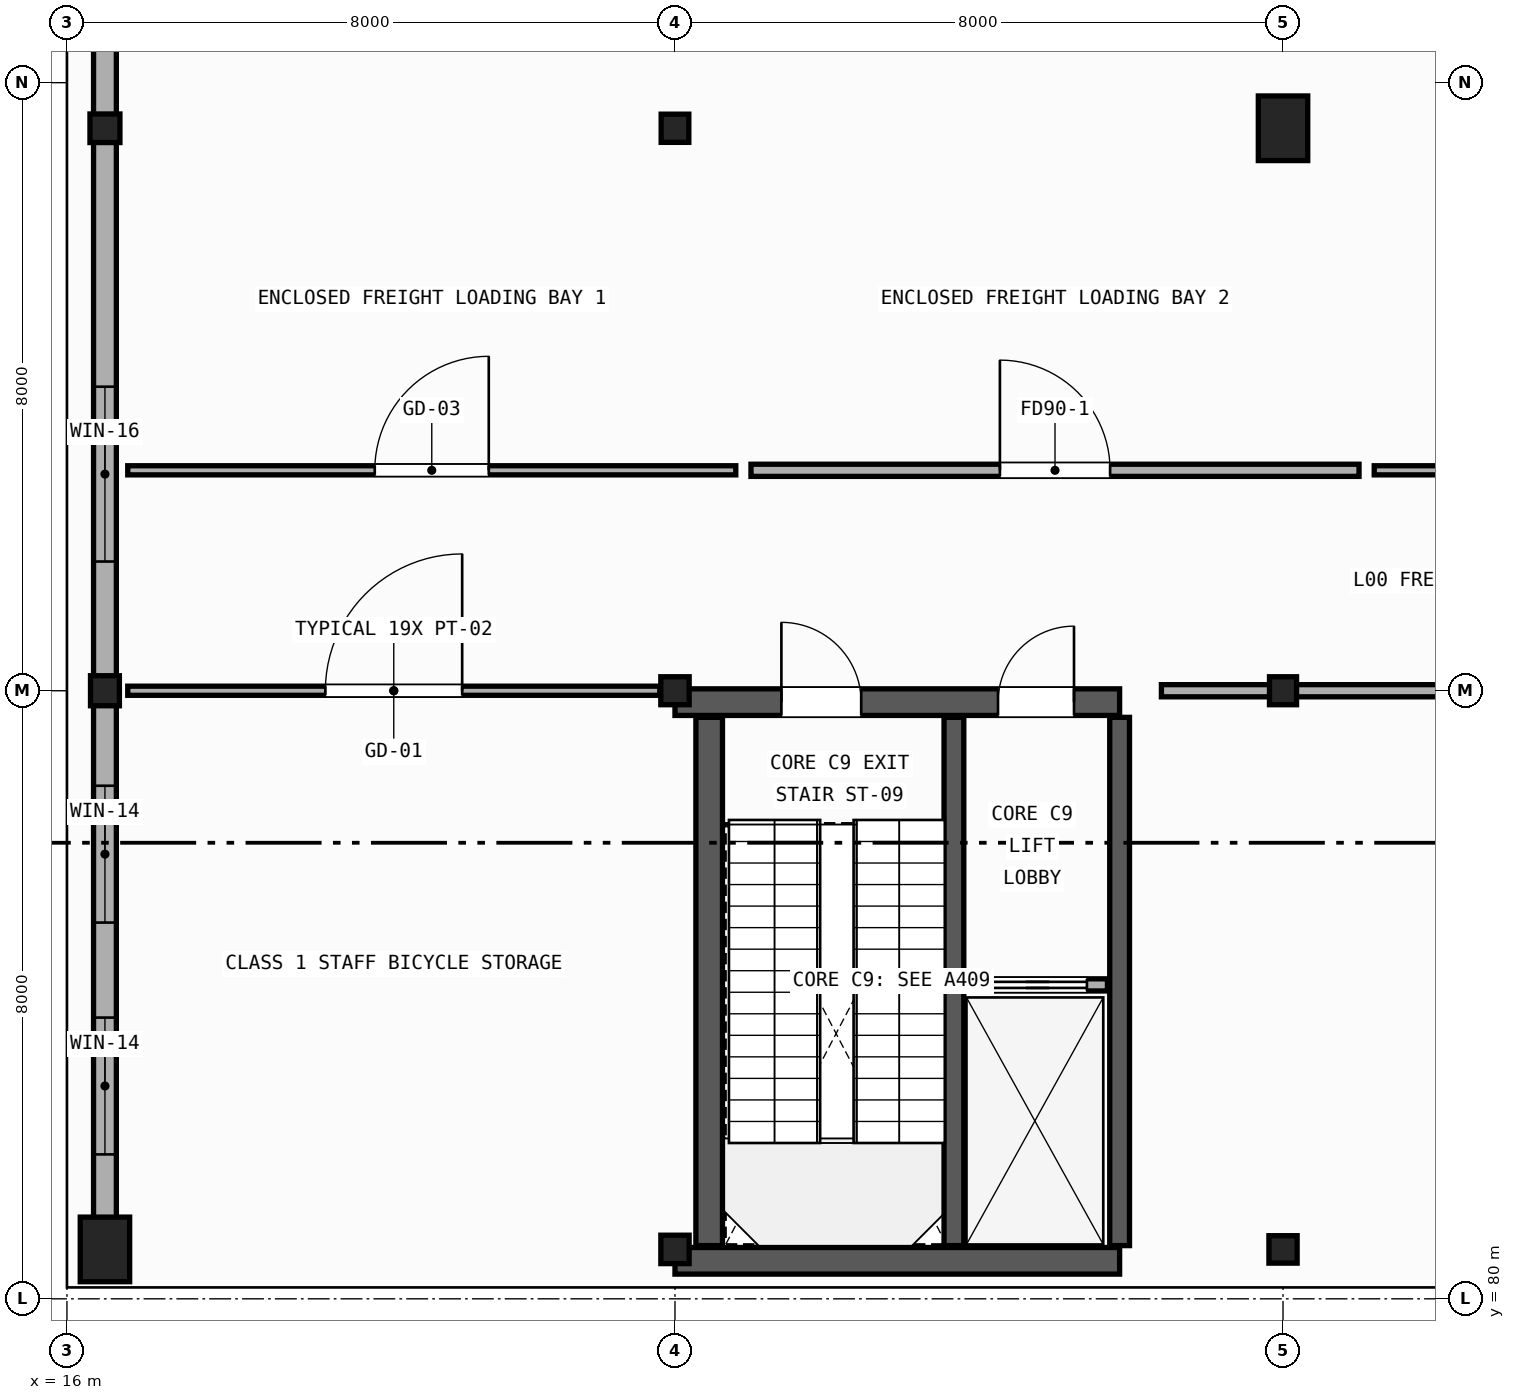
"""IFC4 building model, lengths in metres.
Left out: names, types, materials, properties, quantities, classifications, styles, units other than length and angle.
Written with IfcOpenShell. Run it as: python <this file> out.ifc"""

import sys

from ifc_helpers import new_model, si_unit, direction, frame, frame_2d, origin, origin_2d, place, context, subcontext, project, spatial, rectangle, i_section, extrude, element, fill, save


model = new_model("IFC4")
c1 = context("Model", 3, precision=1e-05, world=origin(), true_north=direction((0.0, 1.0)))
c2 = subcontext(c1, "Body", "Model", "MODEL_VIEW")
j1 = project(units=[si_unit("LENGTHUNIT", "METRE"), si_unit("PLANEANGLEUNIT", "RADIAN")], contexts=[c1])
p1 = place(None, origin())
s1 = spatial("IfcSite", under=j1, at=p1, CompositionType="ELEMENT")
p2 = place(p1, origin())
s2 = spatial("IfcBuilding", under=s1, at=p2, CompositionType="ELEMENT")
p3 = place(p2, origin())
s3 = spatial("IfcBuildingStorey", under=s2, at=p3, CompositionType="ELEMENT", Elevation=0.0)
p4 = place(p3, frame((16.5, 80.65, 0.0), z_axis=(0.0, 0.0, 1.0), x_axis=(1.0, 0.0, 0.0)))
e1 = element("IfcColumn", 1, at=p4, inside=s3, PredefinedType="PILASTER", context=c2, shape_type="SweptSolid", body=[
    extrude(rectangle(XDim=0.65, YDim=0.85, at=origin_2d()), origin(), (0.0, 0.0, 1.0), 5.08),
])
p5 = place(p3, frame((16.5, 88.0, 0.0), z_axis=(0.0, 0.0, 1.0), x_axis=(0.0, 1.0, 0.0)))
e2 = element("IfcColumn", 2, at=p5, inside=s3, PredefinedType="COLUMN", context=c2, shape_type="SweptSolid", body=[
    extrude(i_section(OverallWidth=0.395, OverallDepth=0.38, WebThickness=0.019, FlangeThickness=0.03, FilletRadius=0.015, at=origin_2d()), origin(), (0.0, 0.0, 1.0), 5.08),
])
p6 = place(p3, frame((16.5, 95.4, 0.0), z_axis=(0.0, 0.0, 1.0), x_axis=(1.0, 0.0, 0.0)))
e3 = element("IfcColumn", 3, at=p6, inside=s3, PredefinedType="COLUMN", context=c2, shape_type="SweptSolid", body=[
    extrude(i_section(OverallWidth=0.394, OverallDepth=0.376, WebThickness=0.017, FlangeThickness=0.028, FilletRadius=0.015, at=origin_2d()), origin(), (0.0, 0.0, 1.0), 5.08),
])
p7 = place(p3, frame((24.0, 80.65, 0.0), z_axis=(0.0, 0.0, 1.0), x_axis=(0.0, 1.0, 0.0)))
e4 = element("IfcColumn", 4, at=p7, inside=s3, PredefinedType="COLUMN", context=c2, shape_type="SweptSolid", body=[
    extrude(i_section(OverallWidth=0.374, OverallDepth=0.372, WebThickness=0.016, FlangeThickness=0.026, FilletRadius=0.015, at=origin_2d()), origin(), (0.0, 0.0, 1.0), 5.08),
])
p8 = place(p3, frame((24.0, 88.0, 0.0), z_axis=(0.0, 0.0, 1.0), x_axis=(1.0, 0.0, 0.0)))
e5 = element("IfcColumn", 5, at=p8, inside=s3, PredefinedType="COLUMN", context=c2, shape_type="SweptSolid", body=[
    extrude(i_section(OverallWidth=0.373, OverallDepth=0.368, WebThickness=0.015, FlangeThickness=0.024, FilletRadius=0.015, at=origin_2d()), origin(), (0.0, 0.0, 1.0), 5.08),
])
p9 = place(p3, frame((24.0, 95.4, 0.0), z_axis=(0.0, 0.0, 1.0), x_axis=(0.0, 1.0, 0.0)))
e6 = element("IfcColumn", 6, at=p9, inside=s3, PredefinedType="COLUMN", context=c2, shape_type="SweptSolid", body=[
    extrude(i_section(OverallWidth=0.371, OverallDepth=0.364, WebThickness=0.013, FlangeThickness=0.022, FilletRadius=0.015, at=origin_2d()), origin(), (0.0, 0.0, 1.0), 5.08),
])
p10 = place(p3, frame((32.0, 80.65, 0.0), z_axis=(0.0, 0.0, 1.0), x_axis=(1.0, 0.0, 0.0)))
e7 = element("IfcColumn", 7, at=p10, inside=s3, PredefinedType="COLUMN", context=c2, shape_type="SweptSolid", body=[
    extrude(i_section(OverallWidth=0.371, OverallDepth=0.361, WebThickness=0.012, FlangeThickness=0.02, FilletRadius=0.015, at=origin_2d()), origin(), (0.0, 0.0, 1.0), 5.08),
])
p11 = place(p3, frame((32.0, 88.0, 0.0), z_axis=(0.0, 0.0, 1.0), x_axis=(0.0, 1.0, 0.0)))
e8 = element("IfcColumn", 8, at=p11, inside=s3, PredefinedType="COLUMN", context=c2, shape_type="SweptSolid", body=[
    extrude(i_section(OverallWidth=0.368, OverallDepth=0.356, WebThickness=0.011, FlangeThickness=0.018, FilletRadius=0.015, at=origin_2d()), origin(), (0.0, 0.0, 1.0), 5.08),
])
p12 = place(p3, frame((32.0, 95.4, 0.0), z_axis=(0.0, 0.0, 1.0), x_axis=(1.0, 0.0, 0.0)))
e9 = element("IfcColumn", 9, at=p12, inside=s3, PredefinedType="PILASTER", context=c2, shape_type="SweptSolid", body=[
    extrude(rectangle(XDim=0.65, YDim=0.85, at=origin_2d()), origin(), (0.0, 0.0, 1.0), 5.08),
])
p13 = place(p3, frame((16.5, 80.65, 0.0), z_axis=(0.0, 0.0, 1.0), x_axis=(0.0, 1.0, 0.0)))
e10 = element("IfcWall", 10, at=p13, inside=s3, PredefinedType="STANDARD", context=c2, shape_type="SweptSolid", body=[
    extrude(rectangle(XDim=7.35, YDim=0.3, at=frame_2d((3.675, 0.0))), origin(), (0.0, 0.0, 1.0), 4.362),
])
p14 = place(p13, frame((1.25, 0.0, 2.3)))
e11 = element("IfcOpeningElement", 11, at=p14, cuts=e10, PredefinedType="OPENING", context=c2, shape_type="SweptSolid", body=[
    extrude(rectangle(XDim=1.8, YDim=1.1, at=frame_2d((0.9, 0.55))), frame((0.0, 0.16, 0.0), z_axis=(0.0, -1.0, 0.0), x_axis=(1.0, 0.0, 0.0)), (0.0, 0.0, 1.0), 0.32),
])
p15 = place(p13, frame((4.3, 0.0, 2.3)))
e12 = element("IfcOpeningElement", 12, at=p15, cuts=e10, PredefinedType="OPENING", context=c2, shape_type="SweptSolid", body=[
    extrude(rectangle(XDim=1.8, YDim=1.1, at=frame_2d((0.9, 0.55))), frame((0.0, 0.16, 0.0), z_axis=(0.0, -1.0, 0.0), x_axis=(1.0, 0.0, 0.0)), (0.0, 0.0, 1.0), 0.32),
])
p16 = place(p3, frame((16.5, 88.0, 0.0), z_axis=(0.0, 0.0, 1.0), x_axis=(0.0, 1.0, 0.0)))
e13 = element("IfcWall", 13, at=p16, inside=s3, PredefinedType="STANDARD", context=c2, shape_type="SweptSolid", body=[
    extrude(rectangle(XDim=9.7, YDim=0.3, at=frame_2d((4.85, 0.0))), origin(), (0.0, 0.0, 1.0), 4.362),
])
p17 = place(p16, frame((1.7, 0.0, 0.85)))
e14 = element("IfcOpeningElement", 14, at=p17, cuts=e13, PredefinedType="OPENING", context=c2, shape_type="SweptSolid", body=[
    extrude(rectangle(XDim=2.3, YDim=2.75, at=frame_2d((1.15, 1.375))), frame((0.0, 0.16, 0.0), z_axis=(0.0, -1.0, 0.0), x_axis=(1.0, 0.0, 0.0)), (0.0, 0.0, 1.0), 0.32),
])
p18 = place(p3, frame((24.0, 87.85, 0.0), z_axis=(0.0, 0.0, 1.0), x_axis=(1.0, 0.0, 0.0)))
e15 = element("IfcWall", 15, at=p18, inside=s3, PredefinedType="SHEAR", context=c2, shape_type="SweptSolid", body=[
    extrude(rectangle(XDim=5.85, YDim=0.35, at=frame_2d((2.925, 0.0))), origin(), (0.0, 0.0, 1.0), 5.07),
])
p19 = place(p18, frame((1.4, 0.0, 0.0)))
e16 = element("IfcOpeningElement", 16, at=p19, cuts=e15, PredefinedType="OPENING", context=c2, shape_type="SweptSolid", body=[
    extrude(rectangle(XDim=1.05, YDim=2.1, at=frame_2d((0.525, 1.05))), frame((0.0, 0.185, 0.0), z_axis=(0.0, -1.0, 0.0), x_axis=(1.0, 0.0, 0.0)), (0.0, 0.0, 1.0), 0.37),
])
p20 = place(p18, frame((4.25, 0.0, 0.0)))
e17 = element("IfcOpeningElement", 17, at=p20, cuts=e15, PredefinedType="OPENING", context=c2, shape_type="SweptSolid", body=[
    extrude(rectangle(XDim=1.0, YDim=2.15, at=frame_2d((0.5, 1.075))), frame((0.0, 0.185, 0.0), z_axis=(0.0, -1.0, 0.0), x_axis=(1.0, 0.0, 0.0)), (0.0, 0.0, 1.0), 0.37),
])
p21 = place(p3, frame((24.0, 80.5, 0.0), z_axis=(0.0, 0.0, 1.0), x_axis=(1.0, 0.0, 0.0)))
e18 = element("IfcWall", 18, at=p21, inside=s3, PredefinedType="SHEAR", context=c2, shape_type="SweptSolid", body=[
    extrude(rectangle(XDim=5.85, YDim=0.35, at=frame_2d((2.925, 0.0))), origin(), (0.0, 0.0, 1.0), 5.07),
])
p22 = place(p3, frame((24.45, 80.7, 0.0), z_axis=(0.0, 0.0, 1.0), x_axis=(0.0, 1.0, 0.0)))
e19 = element("IfcWall", 19, at=p22, inside=s3, PredefinedType="SHEAR", context=c2, shape_type="SweptSolid", body=[
    extrude(rectangle(XDim=6.95, YDim=0.35, at=frame_2d((3.475, 0.0))), origin(), (0.0, 0.0, 1.0), 5.07),
])
for number, where, z_axis, x_axis in (
    (20, (29.85, 80.7, 0.0), (0.0, 0.0, 1.0), (0.0, 1.0, 0.0)),
    (21, (27.67, 80.7, 0.0), (0.0, 0.0, 1.0), (0.0, 1.0, 0.0)),
):
    element("IfcWall", number, at=place(p3, frame(where, z_axis=z_axis, x_axis=x_axis)), inside=s3, PredefinedType="SHEAR", context=c2, shape_type="SweptSolid", body=[
        extrude(rectangle(XDim=6.95, YDim=0.26, at=frame_2d((3.475, 0.0))), origin(), (0.0, 0.0, 1.0), 5.07),
    ])
p23 = place(p3, frame((27.85, 84.13, 0.0), z_axis=(0.0, 0.0, 1.0), x_axis=(1.0, 0.0, 0.0)))
e22 = element("IfcWall", 22, at=p23, inside=s3, PredefinedType="PARTITIONING", context=c2, shape_type="SweptSolid", body=[
    extrude(rectangle(XDim=1.84, YDim=0.16, at=frame_2d((0.92, 0.0))), origin(), (0.0, 0.0, 1.0), 3.6),
])
p24 = place(p23, frame((0.27, 0.0, 0.0)))
e23 = element("IfcOpeningElement", 23, at=p24, cuts=e22, PredefinedType="OPENING", context=c2, shape_type="SweptSolid", body=[
    extrude(rectangle(XDim=1.3, YDim=2.2, at=frame_2d((0.65, 1.1))), frame((0.0, 0.09, 0.0), z_axis=(0.0, -1.0, 0.0), x_axis=(1.0, 0.0, 0.0)), (0.0, 0.0, 1.0), 0.18),
])
p25 = place(p3, frame((16.8, 88.0, 0.0), z_axis=(0.0, 0.0, 1.0), x_axis=(1.0, 0.0, 0.0)))
e24 = element("IfcWall", 24, at=p25, inside=s3, PredefinedType="PARTITIONING", context=c2, shape_type="SweptSolid", body=[
    extrude(rectangle(XDim=7.0, YDim=0.12, at=frame_2d((3.5, 0.0))), origin(), (0.0, 0.0, 1.0), 4.29),
])
p26 = place(p25, frame((2.6, 0.0, 0.0)))
e25 = element("IfcOpeningElement", 25, at=p26, cuts=e24, PredefinedType="OPENING", context=c2, shape_type="SweptSolid", body=[
    extrude(rectangle(XDim=1.8, YDim=2.4, at=frame_2d((0.9, 1.2))), frame((0.0, 0.07, 0.0), z_axis=(0.0, -1.0, 0.0), x_axis=(1.0, 0.0, 0.0)), (0.0, 0.0, 1.0), 0.14),
])
p27 = place(p3, frame((30.4, 88.0, 0.0), z_axis=(0.0, 0.0, 1.0), x_axis=(1.0, 0.0, 0.0)))
e26 = element("IfcWall", 26, at=p27, inside=s3, PredefinedType="PARTITIONING", context=c2, shape_type="SweptSolid", body=[
    extrude(rectangle(XDim=24.6, YDim=0.16, at=frame_2d((12.3, 0.0))), origin(), (0.0, 0.0, 1.0), 4.278),
])
p28 = place(p27, frame((11.475, 0.0, 0.0)))
e27 = element("IfcOpeningElement", 27, at=p28, cuts=e26, PredefinedType="OPENING", context=c2, shape_type="SweptSolid", body=[
    extrude(rectangle(XDim=1.65, YDim=2.35, at=frame_2d((0.825, 1.175))), frame((0.0, 0.09, 0.0), z_axis=(0.0, -1.0, 0.0), x_axis=(1.0, 0.0, 0.0)), (0.0, 0.0, 1.0), 0.18),
])
p29 = place(p3, frame((16.8, 90.9, 0.0), z_axis=(0.0, 0.0, 1.0), x_axis=(1.0, 0.0, 0.0)))
e28 = element("IfcWall", 28, at=p29, inside=s3, PredefinedType="PARTITIONING", context=c2, shape_type="SweptSolid", body=[
    extrude(rectangle(XDim=8.0, YDim=0.12, at=frame_2d((4.0, 0.0))), origin(), (0.0, 0.0, 1.0), 4.29),
])
p30 = place(p29, frame((3.25, 0.0, 0.0)))
e29 = element("IfcOpeningElement", 29, at=p30, cuts=e28, PredefinedType="OPENING", context=c2, shape_type="SweptSolid", body=[
    extrude(rectangle(XDim=1.5, YDim=2.3, at=frame_2d((0.75, 1.15))), frame((0.0, 0.07, 0.0), z_axis=(0.0, -1.0, 0.0), x_axis=(1.0, 0.0, 0.0)), (0.0, 0.0, 1.0), 0.14),
])
p31 = place(p3, frame((25.0, 90.9, 0.0), z_axis=(0.0, 0.0, 1.0), x_axis=(1.0, 0.0, 0.0)))
e30 = element("IfcWall", 30, at=p31, inside=s3, PredefinedType="PARTITIONING", context=c2, shape_type="SweptSolid", body=[
    extrude(rectangle(XDim=8.0, YDim=0.16, at=frame_2d((4.0, 0.0))), origin(), (0.0, 0.0, 1.0), 4.29),
])
p32 = place(p31, frame((3.275, 0.0, 0.0)))
e31 = element("IfcOpeningElement", 31, at=p32, cuts=e30, PredefinedType="OPENING", context=c2, shape_type="SweptSolid", body=[
    extrude(rectangle(XDim=1.45, YDim=2.25, at=frame_2d((0.725, 1.125))), frame((0.0, 0.09, 0.0), z_axis=(0.0, -1.0, 0.0), x_axis=(1.0, 0.0, 0.0)), (0.0, 0.0, 1.0), 0.18),
])
p33 = place(p3, frame((33.2, 90.9, 0.0), z_axis=(0.0, 0.0, 1.0), x_axis=(1.0, 0.0, 0.0)))
e32 = element("IfcWall", 32, at=p33, inside=s3, PredefinedType="PARTITIONING", context=c2, shape_type="SweptSolid", body=[
    extrude(rectangle(XDim=15.0, YDim=0.12, at=frame_2d((7.5, 0.0))), origin(), (0.0, 0.0, 1.0), 4.278),
])
p34 = place(p33, frame((6.825, 0.0, 0.0)))
e33 = element("IfcOpeningElement", 33, at=p34, cuts=e32, PredefinedType="OPENING", context=c2, shape_type="SweptSolid", body=[
    extrude(rectangle(XDim=1.35, YDim=2.25, at=frame_2d((0.675, 1.125))), frame((0.0, 0.07, 0.0), z_axis=(0.0, -1.0, 0.0), x_axis=(1.0, 0.0, 0.0)), (0.0, 0.0, 1.0), 0.14),
])
p35 = place(p14, origin())
e34 = element("IfcWindow", 34, at=p35, inside=s3, PartitioningType="SINGLE_PANEL", PredefinedType="WINDOW", context=c2, shape_type="SweptSolid", body=[
    extrude(rectangle(XDim=1.8, YDim=1.1, at=frame_2d((0.9, 0.55))), frame((0.0, 0.03, 0.0), z_axis=(0.0, -1.0, 0.0), x_axis=(1.0, 0.0, 0.0)), (0.0, 0.0, 1.0), 0.06),
])
fill(e11, e34)
p36 = place(p15, origin())
e35 = element("IfcWindow", 35, at=p36, inside=s3, PartitioningType="SINGLE_PANEL", PredefinedType="WINDOW", context=c2, shape_type="SweptSolid", body=[
    extrude(rectangle(XDim=1.8, YDim=1.1, at=frame_2d((0.9, 0.55))), frame((0.0, 0.03, 0.0), z_axis=(0.0, -1.0, 0.0), x_axis=(1.0, 0.0, 0.0)), (0.0, 0.0, 1.0), 0.06),
])
fill(e12, e35)
p37 = place(p17, origin())
e36 = element("IfcWindow", 36, at=p37, inside=s3, PartitioningType="SINGLE_PANEL", PredefinedType="WINDOW", context=c2, shape_type="SweptSolid", body=[
    extrude(rectangle(XDim=2.3, YDim=2.75, at=frame_2d((1.15, 1.375))), frame((0.0, 0.03, 0.0), z_axis=(0.0, -1.0, 0.0), x_axis=(1.0, 0.0, 0.0)), (0.0, 0.0, 1.0), 0.06),
])
fill(e14, e36)
p38 = place(p24, origin())
e37 = element("IfcDoor", 37, at=p38, inside=s3, OperationType="SLIDING_TO_LEFT", PredefinedType="DOOR", context=c2, shape_type="SweptSolid", body=[
    extrude(rectangle(XDim=1.3, YDim=2.2, at=frame_2d((0.65, 1.1))), frame((0.0, 0.025, 0.0), z_axis=(0.0, -1.0, 0.0), x_axis=(1.0, 0.0, 0.0)), (0.0, 0.0, 1.0), 0.05),
])
fill(e23, e37)
p39 = place(p19, origin())
e38 = element("IfcDoor", 38, at=p39, inside=s3, OperationType="SINGLE_SWING_LEFT", PredefinedType="DOOR", context=c2, shape_type="SweptSolid", body=[
    extrude(rectangle(XDim=1.05, YDim=2.1, at=frame_2d((0.525, 1.05))), frame((0.0, 0.025, 0.0), z_axis=(0.0, -1.0, 0.0), x_axis=(1.0, 0.0, 0.0)), (0.0, 0.0, 1.0), 0.05),
])
fill(e16, e38)
p40 = place(p20, origin())
e39 = element("IfcDoor", 39, at=p40, inside=s3, OperationType="SINGLE_SWING_RIGHT", PredefinedType="DOOR", context=c2, shape_type="SweptSolid", body=[
    extrude(rectangle(XDim=1.0, YDim=2.15, at=frame_2d((0.5, 1.075))), frame((0.0, 0.025, 0.0), z_axis=(0.0, -1.0, 0.0), x_axis=(1.0, 0.0, 0.0)), (0.0, 0.0, 1.0), 0.05),
])
fill(e17, e39)
p41 = place(p26, origin())
e40 = element("IfcDoor", 40, at=p41, inside=s3, OperationType="SINGLE_SWING_RIGHT", PredefinedType="DOOR", context=c2, shape_type="SweptSolid", body=[
    extrude(rectangle(XDim=1.8, YDim=2.4, at=frame_2d((0.9, 1.2))), frame((0.0, 0.025, 0.0), z_axis=(0.0, -1.0, 0.0), x_axis=(1.0, 0.0, 0.0)), (0.0, 0.0, 1.0), 0.05),
])
fill(e25, e40)
p42 = place(p30, origin())
e41 = element("IfcDoor", 41, at=p42, inside=s3, OperationType="SINGLE_SWING_RIGHT", PredefinedType="DOOR", context=c2, shape_type="SweptSolid", body=[
    extrude(rectangle(XDim=1.5, YDim=2.3, at=frame_2d((0.75, 1.15))), frame((0.0, 0.025, 0.0), z_axis=(0.0, -1.0, 0.0), x_axis=(1.0, 0.0, 0.0)), (0.0, 0.0, 1.0), 0.05),
])
fill(e29, e41)
p43 = place(p32, origin())
e42 = element("IfcDoor", 42, at=p43, inside=s3, OperationType="SINGLE_SWING_LEFT", PredefinedType="DOOR", context=c2, shape_type="SweptSolid", body=[
    extrude(rectangle(XDim=1.45, YDim=2.25, at=frame_2d((0.725, 1.125))), frame((0.0, 0.025, 0.0), z_axis=(0.0, -1.0, 0.0), x_axis=(1.0, 0.0, 0.0)), (0.0, 0.0, 1.0), 0.05),
])
fill(e31, e42)
save(model, sys.argv[1])
